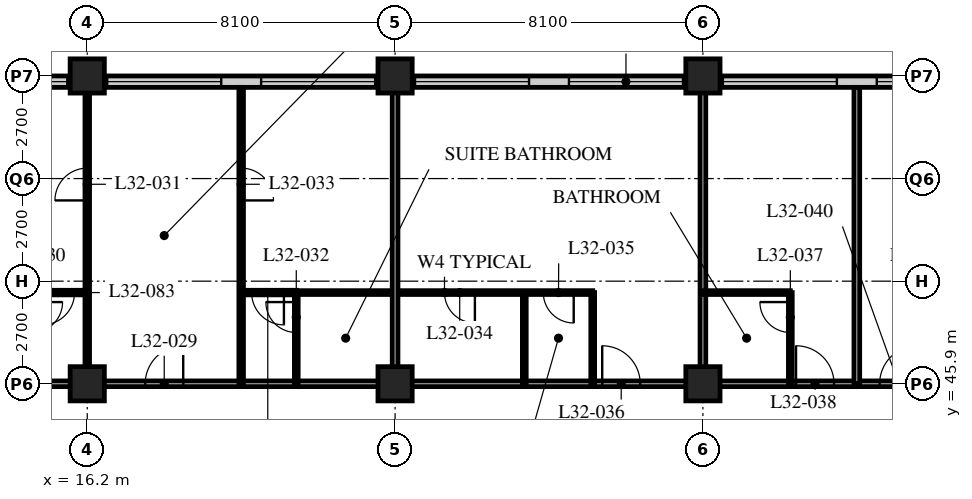
"""IFC4 building model, lengths in metres.
Left out: names, types, materials, properties, quantities, classifications, styles, units other than length and angle.
Written with IfcOpenShell. Run it as: python <this file> out.ifc"""

import sys

from ifc_helpers import new_model, si_unit, direction, frame, frame_2d, origin, origin_2d, place, context, subcontext, project, spatial, rectangle, hollow_rectangle, extrude, element, fill, save


model = new_model("IFC4")
c1 = context("Model", 3, precision=1e-05, world=origin(), true_north=direction((0.0, 1.0)))
c2 = subcontext(c1, "Body", "Model", "MODEL_VIEW")
j1 = project(units=[si_unit("LENGTHUNIT", "METRE"), si_unit("PLANEANGLEUNIT", "RADIAN")], contexts=[c1])
p1 = place(None, origin())
s1 = spatial("IfcSite", under=j1, at=p1, CompositionType="ELEMENT")
p2 = place(p1, origin())
s2 = spatial("IfcBuilding", under=s1, at=p2, CompositionType="ELEMENT")
p3 = place(p2, frame((0.0, 0.0, 127.2)))
s3 = spatial("IfcBuildingStorey", under=s2, at=p3, CompositionType="ELEMENT", Elevation=127.2)
for number, where, z_axis, x_axis in (
    (1, (16.2, 45.9, 0.0), (0.0, 0.0, 1.0), (1.0, 0.0, 0.0)),
    (2, (16.2, 54.0, 0.0), (0.0, 0.0, 1.0), (1.0, 0.0, 0.0)),
    (3, (24.3, 45.9, 0.0), (0.0, 0.0, 1.0), (1.0, 0.0, 0.0)),
    (4, (24.3, 54.0, 0.0), (0.0, 0.0, 1.0), (1.0, 0.0, 0.0)),
    (5, (32.4, 45.9, 0.0), (0.0, 0.0, 1.0), (1.0, 0.0, 0.0)),
    (6, (32.4, 54.0, 0.0), (0.0, 0.0, 1.0), (1.0, 0.0, 0.0)),
):
    element("IfcColumn", number, at=place(p3, frame(where, z_axis=z_axis, x_axis=x_axis)), inside=s3, PredefinedType="COLUMN", context=c2, shape_type="SweptSolid", body=[
        extrude(hollow_rectangle(XDim=0.9, YDim=0.9, WallThickness=0.09, at=origin_2d()), origin(), (0.0, 0.0, 1.0), 3.4),
    ])
p4 = place(p3, frame((48.3, 53.85, 0.0), z_axis=(0.0, 0.0, 1.0), x_axis=(-1.0, 0.0, 0.0)))
e7 = element("IfcWall", 7, at=p4, inside=s3, PredefinedType="SOLIDWALL", context=c2, shape_type="SweptSolid", body=[
    extrude(rectangle(XDim=40.2, YDim=0.3, at=frame_2d((20.1, 0.0))), origin(), (0.0, 0.0, 1.0), 3.19),
])
p5 = place(p4, frame((0.225, 0.0, 0.9)))
e8 = element("IfcOpeningElement", 8, at=p5, cuts=e7, PredefinedType="OPENING", context=c2, shape_type="SweptSolid", body=[
    extrude(rectangle(XDim=3.0, YDim=2.0, at=frame_2d((1.5, 1.0))), frame((0.0, 0.16, 0.0), z_axis=(0.0, -1.0, 0.0), x_axis=(1.0, 0.0, 0.0)), (0.0, 0.0, 1.0), 0.32),
])
p6 = place(p4, frame((4.275, 0.0, 0.9)))
e9 = element("IfcOpeningElement", 9, at=p6, cuts=e7, PredefinedType="OPENING", context=c2, shape_type="SweptSolid", body=[
    extrude(rectangle(XDim=3.0, YDim=2.0, at=frame_2d((1.5, 1.0))), frame((0.0, 0.16, 0.0), z_axis=(0.0, -1.0, 0.0), x_axis=(1.0, 0.0, 0.0)), (0.0, 0.0, 1.0), 0.32),
])
p7 = place(p4, frame((8.325, 0.0, 0.9)))
e10 = element("IfcOpeningElement", 10, at=p7, cuts=e7, PredefinedType="OPENING", context=c2, shape_type="SweptSolid", body=[
    extrude(rectangle(XDim=3.0, YDim=2.0, at=frame_2d((1.5, 1.0))), frame((0.0, 0.16, 0.0), z_axis=(0.0, -1.0, 0.0), x_axis=(1.0, 0.0, 0.0)), (0.0, 0.0, 1.0), 0.32),
])
p8 = place(p4, frame((12.375, 0.0, 0.9)))
e11 = element("IfcOpeningElement", 11, at=p8, cuts=e7, PredefinedType="OPENING", context=c2, shape_type="SweptSolid", body=[
    extrude(rectangle(XDim=3.0, YDim=2.0, at=frame_2d((1.5, 1.0))), frame((0.0, 0.16, 0.0), z_axis=(0.0, -1.0, 0.0), x_axis=(1.0, 0.0, 0.0)), (0.0, 0.0, 1.0), 0.32),
])
p9 = place(p4, frame((16.425, 0.0, 0.9)))
e12 = element("IfcOpeningElement", 12, at=p9, cuts=e7, PredefinedType="OPENING", context=c2, shape_type="SweptSolid", body=[
    extrude(rectangle(XDim=3.0, YDim=2.0, at=frame_2d((1.5, 1.0))), frame((0.0, 0.16, 0.0), z_axis=(0.0, -1.0, 0.0), x_axis=(1.0, 0.0, 0.0)), (0.0, 0.0, 1.0), 0.32),
])
p10 = place(p4, frame((20.475, 0.0, 0.9)))
e13 = element("IfcOpeningElement", 13, at=p10, cuts=e7, PredefinedType="OPENING", context=c2, shape_type="SweptSolid", body=[
    extrude(rectangle(XDim=3.0, YDim=2.0, at=frame_2d((1.5, 1.0))), frame((0.0, 0.16, 0.0), z_axis=(0.0, -1.0, 0.0), x_axis=(1.0, 0.0, 0.0)), (0.0, 0.0, 1.0), 0.32),
])
p11 = place(p4, frame((24.525, 0.0, 0.9)))
e14 = element("IfcOpeningElement", 14, at=p11, cuts=e7, PredefinedType="OPENING", context=c2, shape_type="SweptSolid", body=[
    extrude(rectangle(XDim=3.0, YDim=2.0, at=frame_2d((1.5, 1.0))), frame((0.0, 0.16, 0.0), z_axis=(0.0, -1.0, 0.0), x_axis=(1.0, 0.0, 0.0)), (0.0, 0.0, 1.0), 0.32),
])
p12 = place(p4, frame((28.575, 0.0, 0.9)))
e15 = element("IfcOpeningElement", 15, at=p12, cuts=e7, PredefinedType="OPENING", context=c2, shape_type="SweptSolid", body=[
    extrude(rectangle(XDim=3.0, YDim=2.0, at=frame_2d((1.5, 1.0))), frame((0.0, 0.16, 0.0), z_axis=(0.0, -1.0, 0.0), x_axis=(1.0, 0.0, 0.0)), (0.0, 0.0, 1.0), 0.32),
])
p13 = place(p4, frame((32.625, 0.0, 0.9)))
e16 = element("IfcOpeningElement", 16, at=p13, cuts=e7, PredefinedType="OPENING", context=c2, shape_type="SweptSolid", body=[
    extrude(rectangle(XDim=3.0, YDim=2.0, at=frame_2d((1.5, 1.0))), frame((0.0, 0.16, 0.0), z_axis=(0.0, -1.0, 0.0), x_axis=(1.0, 0.0, 0.0)), (0.0, 0.0, 1.0), 0.32),
])
p14 = place(p4, frame((36.675, 0.0, 0.9)))
e17 = element("IfcOpeningElement", 17, at=p14, cuts=e7, PredefinedType="OPENING", context=c2, shape_type="SweptSolid", body=[
    extrude(rectangle(XDim=3.0, YDim=2.0, at=frame_2d((1.5, 1.0))), frame((0.0, 0.16, 0.0), z_axis=(0.0, -1.0, 0.0), x_axis=(1.0, 0.0, 0.0)), (0.0, 0.0, 1.0), 0.32),
])
p15 = place(p3, frame((8.1, 45.9, 0.0), z_axis=(0.0, 0.0, 1.0), x_axis=(1.0, 0.0, 0.0)))
e18 = element("IfcWall", 18, at=p15, inside=s3, PredefinedType="PARTITIONING", context=c2, shape_type="SweptSolid", body=[
    extrude(rectangle(XDim=40.5, YDim=0.15, at=frame_2d((20.25, 0.0))), origin(), (0.0, 0.0, 1.0), 2.578),
])
p16 = place(p15, frame((9.625, 0.0, 0.0)))
e19 = element("IfcOpeningElement", 19, at=p16, cuts=e18, PredefinedType="OPENING", context=c2, shape_type="SweptSolid", body=[
    extrude(rectangle(XDim=1.0, YDim=2.1, at=frame_2d((0.5, 1.05))), frame((0.0, 0.085, 0.0), z_axis=(0.0, -1.0, 0.0), x_axis=(1.0, 0.0, 0.0)), (0.0, 0.0, 1.0), 0.17),
])
p17 = place(p15, frame((21.65, 0.0, 0.0)))
e20 = element("IfcOpeningElement", 20, at=p17, cuts=e18, PredefinedType="OPENING", context=c2, shape_type="SweptSolid", body=[
    extrude(rectangle(XDim=1.0, YDim=2.1, at=frame_2d((0.5, 1.05))), frame((0.0, 0.085, 0.0), z_axis=(0.0, -1.0, 0.0), x_axis=(1.0, 0.0, 0.0)), (0.0, 0.0, 1.0), 0.17),
])
p18 = place(p15, frame((26.75, 0.0, 0.0)))
e21 = element("IfcOpeningElement", 21, at=p18, cuts=e18, PredefinedType="OPENING", context=c2, shape_type="SweptSolid", body=[
    extrude(rectangle(XDim=1.0, YDim=2.1, at=frame_2d((0.5, 1.05))), frame((0.0, 0.085, 0.0), z_axis=(0.0, -1.0, 0.0), x_axis=(1.0, 0.0, 0.0)), (0.0, 0.0, 1.0), 0.17),
])
p19 = place(p15, frame((28.95, 0.0, 0.0)))
e22 = element("IfcOpeningElement", 22, at=p19, cuts=e18, PredefinedType="OPENING", context=c2, shape_type="SweptSolid", body=[
    extrude(rectangle(XDim=1.0, YDim=2.1, at=frame_2d((0.5, 1.05))), frame((0.0, 0.085, 0.0), z_axis=(0.0, -1.0, 0.0), x_axis=(1.0, 0.0, 0.0)), (0.0, 0.0, 1.0), 0.17),
])
p20 = place(p15, frame((34.85, 0.0, 0.0)))
e23 = element("IfcOpeningElement", 23, at=p20, cuts=e18, PredefinedType="OPENING", context=c2, shape_type="SweptSolid", body=[
    extrude(rectangle(XDim=1.0, YDim=2.1, at=frame_2d((0.5, 1.05))), frame((0.0, 0.085, 0.0), z_axis=(0.0, -1.0, 0.0), x_axis=(1.0, 0.0, 0.0)), (0.0, 0.0, 1.0), 0.17),
])
p21 = place(p15, frame((36.875, 0.0, 0.0)))
e24 = element("IfcOpeningElement", 24, at=p21, cuts=e18, PredefinedType="OPENING", context=c2, shape_type="SweptSolid", body=[
    extrude(rectangle(XDim=1.0, YDim=2.1, at=frame_2d((0.5, 1.05))), frame((0.0, 0.085, 0.0), z_axis=(0.0, -1.0, 0.0), x_axis=(1.0, 0.0, 0.0)), (0.0, 0.0, 1.0), 0.17),
])
p22 = place(p15, frame((2.625, 0.0, 0.0)))
e25 = element("IfcOpeningElement", 25, at=p22, cuts=e18, PredefinedType="OPENING", context=c2, shape_type="SweptSolid", body=[
    extrude(rectangle(XDim=1.0, YDim=2.1, at=frame_2d((0.5, 1.05))), frame((0.0, 0.085, 0.0), z_axis=(0.0, -1.0, 0.0), x_axis=(1.0, 0.0, 0.0)), (0.0, 0.0, 1.0), 0.17),
])
p23 = place(p3, frame((16.2, 45.9, 0.0), z_axis=(0.0, 0.0, 1.0), x_axis=(0.0, 1.0, 0.0)))
e26 = element("IfcWall", 26, at=p23, inside=s3, PredefinedType="PARTITIONING", context=c2, shape_type="SweptSolid", body=[
    extrude(rectangle(XDim=7.8, YDim=0.12, at=frame_2d((3.9, 0.0))), origin(), (0.0, 0.0, 1.0), 2.578),
])
p24 = place(p23, frame((4.825, 0.0, 0.0)))
e27 = element("IfcOpeningElement", 27, at=p24, cuts=e26, PredefinedType="OPENING", context=c2, shape_type="SweptSolid", body=[
    extrude(rectangle(XDim=0.85, YDim=2.1, at=frame_2d((0.425, 1.05))), frame((0.0, 0.07, 0.0), z_axis=(0.0, -1.0, 0.0), x_axis=(1.0, 0.0, 0.0)), (0.0, 0.0, 1.0), 0.14),
])
p25 = place(p3, frame((21.7, 48.3, 0.0), z_axis=(0.0, 0.0, 1.0), x_axis=(1.0, 0.0, 0.0)))
e28 = element("IfcWall", 28, at=p25, inside=s3, PredefinedType="PARTITIONING", context=c2, shape_type="SweptSolid", body=[
    extrude(rectangle(XDim=7.8, YDim=0.1, at=frame_2d((3.9, 0.0))), origin(), (0.0, 0.0, 1.0), 3.19),
])
p26 = place(p25, frame((3.9, 0.0, 0.0)))
e29 = element("IfcOpeningElement", 29, at=p26, cuts=e28, PredefinedType="OPENING", context=c2, shape_type="SweptSolid", body=[
    extrude(rectangle(XDim=0.8, YDim=2.1, at=frame_2d((0.4, 1.05))), frame((0.0, 0.06, 0.0), z_axis=(0.0, -1.0, 0.0), x_axis=(1.0, 0.0, 0.0)), (0.0, 0.0, 1.0), 0.12),
])
p27 = place(p25, frame((6.5, 0.0, 0.0)))
e30 = element("IfcOpeningElement", 30, at=p27, cuts=e28, PredefinedType="OPENING", context=c2, shape_type="SweptSolid", body=[
    extrude(rectangle(XDim=0.8, YDim=2.1, at=frame_2d((0.4, 1.05))), frame((0.0, 0.06, 0.0), z_axis=(0.0, -1.0, 0.0), x_axis=(1.0, 0.0, 0.0)), (0.0, 0.0, 1.0), 0.12),
])
p28 = place(p3, frame((21.7, 45.9, 0.0), z_axis=(0.0, 0.0, 1.0), x_axis=(0.0, 1.0, 0.0)))
e31 = element("IfcWall", 31, at=p28, inside=s3, PredefinedType="PARTITIONING", context=c2, shape_type="SweptSolid", body=[
    extrude(rectangle(XDim=2.4, YDim=0.1, at=frame_2d((1.2, 0.0))), origin(), (0.0, 0.0, 1.0), 3.19),
])
p29 = place(p28, frame((1.35, 0.0, 0.0)))
e32 = element("IfcOpeningElement", 32, at=p29, cuts=e31, PredefinedType="OPENING", context=c2, shape_type="SweptSolid", body=[
    extrude(rectangle(XDim=0.8, YDim=2.1, at=frame_2d((0.4, 1.05))), frame((0.0, 0.06, 0.0), z_axis=(0.0, -1.0, 0.0), x_axis=(1.0, 0.0, 0.0)), (0.0, 0.0, 1.0), 0.12),
])
p30 = place(p3, frame((20.25, 45.9, 0.0), z_axis=(0.0, 0.0, 1.0), x_axis=(0.0, 1.0, 0.0)))
e33 = element("IfcWall", 33, at=p30, inside=s3, PredefinedType="PARTITIONING", context=c2, shape_type="SweptSolid", body=[
    extrude(rectangle(XDim=7.8, YDim=0.12, at=frame_2d((3.9, 0.0))), origin(), (0.0, 0.0, 1.0), 3.19),
])
p31 = place(p30, frame((4.825, 0.0, 0.0)))
e34 = element("IfcOpeningElement", 34, at=p31, cuts=e33, PredefinedType="OPENING", context=c2, shape_type="SweptSolid", body=[
    extrude(rectangle(XDim=0.85, YDim=2.1, at=frame_2d((0.425, 1.05))), frame((0.0, 0.07, 0.0), z_axis=(0.0, -1.0, 0.0), x_axis=(1.0, 0.0, 0.0)), (0.0, 0.0, 1.0), 0.14),
])
p32 = place(p3, frame((24.3, 45.9, 0.0), z_axis=(0.0, 0.0, 1.0), x_axis=(0.0, 1.0, 0.0)))
e35 = element("IfcWall", 35, at=p32, inside=s3, PredefinedType="PARTITIONING", context=c2, shape_type="SweptSolid", body=[
    extrude(rectangle(XDim=7.8, YDim=0.15, at=frame_2d((3.9, 0.0))), origin(), (0.0, 0.0, 1.0), 2.578),
])
for number, where, z_axis, x_axis in (
    (36, (27.7, 45.9, 0.0), (0.0, 0.0, 1.0), (0.0, 1.0, 0.0)),
    (37, (29.5, 45.9, 0.0), (0.0, 0.0, 1.0), (0.0, 1.0, 0.0)),
):
    element("IfcWall", number, at=place(p3, frame(where, z_axis=z_axis, x_axis=x_axis)), inside=s3, PredefinedType="PARTITIONING", context=c2, shape_type="SweptSolid", body=[
        extrude(rectangle(XDim=2.4, YDim=0.1, at=frame_2d((1.2, 0.0))), origin(), (0.0, 0.0, 1.0), 3.19),
    ])
p33 = place(p3, frame((32.4, 45.9, 0.0), z_axis=(0.0, 0.0, 1.0), x_axis=(0.0, 1.0, 0.0)))
e38 = element("IfcWall", 38, at=p33, inside=s3, PredefinedType="PARTITIONING", context=c2, shape_type="SweptSolid", body=[
    extrude(rectangle(XDim=7.8, YDim=0.15, at=frame_2d((3.9, 0.0))), origin(), (0.0, 0.0, 1.0), 2.578),
])
p34 = place(p3, frame((32.4, 48.3, 0.0), z_axis=(0.0, 0.0, 1.0), x_axis=(1.0, 0.0, 0.0)))
e39 = element("IfcWall", 39, at=p34, inside=s3, PredefinedType="PARTITIONING", context=c2, shape_type="SweptSolid", body=[
    extrude(rectangle(XDim=2.3, YDim=0.1, at=frame_2d((1.15, 0.0))), origin(), (0.0, 0.0, 1.0), 3.19),
])
p35 = place(p3, frame((34.7, 45.9, 0.0), z_axis=(0.0, 0.0, 1.0), x_axis=(0.0, 1.0, 0.0)))
e40 = element("IfcWall", 40, at=p35, inside=s3, PredefinedType="PARTITIONING", context=c2, shape_type="SweptSolid", body=[
    extrude(rectangle(XDim=2.4, YDim=0.1, at=frame_2d((1.2, 0.0))), origin(), (0.0, 0.0, 1.0), 3.19),
])
p36 = place(p35, frame((1.35, 0.0, 0.0)))
e41 = element("IfcOpeningElement", 41, at=p36, cuts=e40, PredefinedType="OPENING", context=c2, shape_type="SweptSolid", body=[
    extrude(rectangle(XDim=0.8, YDim=2.1, at=frame_2d((0.4, 1.05))), frame((0.0, 0.06, 0.0), z_axis=(0.0, -1.0, 0.0), x_axis=(1.0, 0.0, 0.0)), (0.0, 0.0, 1.0), 0.12),
])
p37 = place(p3, frame((36.45, 45.9, 0.0), z_axis=(0.0, 0.0, 1.0), x_axis=(0.0, 1.0, 0.0)))
e42 = element("IfcWall", 42, at=p37, inside=s3, PredefinedType="PARTITIONING", context=c2, shape_type="SweptSolid", body=[
    extrude(rectangle(XDim=7.8, YDim=0.15, at=frame_2d((3.9, 0.0))), origin(), (0.0, 0.0, 1.0), 3.19),
])
p38 = place(p3, frame((14.74, 48.3, 0.0), z_axis=(0.0, 0.0, 1.0), x_axis=(1.0, 0.0, 0.0)))
e43 = element("IfcWall", 43, at=p38, inside=s3, PredefinedType="PARTITIONING", context=c2, shape_type="SweptSolid", body=[
    extrude(rectangle(XDim=1.46, YDim=0.12, at=frame_2d((0.73, 0.0))), origin(), (0.0, 0.0, 1.0), 3.19),
])
p39 = place(p38, frame((0.275, 0.0, 0.0)))
e44 = element("IfcOpeningElement", 44, at=p39, cuts=e43, PredefinedType="OPENING", context=c2, shape_type="SweptSolid", body=[
    extrude(rectangle(XDim=0.85, YDim=2.1, at=frame_2d((0.425, 1.05))), frame((0.0, 0.07, 0.0), z_axis=(0.0, -1.0, 0.0), x_axis=(1.0, 0.0, 0.0)), (0.0, 0.0, 1.0), 0.14),
])
p40 = place(p3, frame((20.25, 48.3, 0.0), z_axis=(0.0, 0.0, 1.0), x_axis=(1.0, 0.0, 0.0)))
e45 = element("IfcWall", 45, at=p40, inside=s3, PredefinedType="PARTITIONING", context=c2, shape_type="SweptSolid", body=[
    extrude(rectangle(XDim=1.46, YDim=0.12, at=frame_2d((0.73, 0.0))), origin(), (0.0, 0.0, 1.0), 3.19),
])
p41 = place(p40, frame((0.275, 0.0, 0.0)))
e46 = element("IfcOpeningElement", 46, at=p41, cuts=e45, PredefinedType="OPENING", context=c2, shape_type="SweptSolid", body=[
    extrude(rectangle(XDim=0.85, YDim=2.1, at=frame_2d((0.425, 1.05))), frame((0.0, 0.07, 0.0), z_axis=(0.0, -1.0, 0.0), x_axis=(1.0, 0.0, 0.0)), (0.0, 0.0, 1.0), 0.14),
])
p42 = place(p7, origin())
e47 = element("IfcWindow", 47, at=p42, inside=s3, PartitioningType="SINGLE_PANEL", PredefinedType="WINDOW", context=c2, shape_type="SweptSolid", body=[
    extrude(rectangle(XDim=3.0, YDim=2.0, at=frame_2d((1.5, 1.0))), frame((0.0, 0.03, 0.0), z_axis=(0.0, -1.0, 0.0), x_axis=(1.0, 0.0, 0.0)), (0.0, 0.0, 1.0), 0.06),
])
fill(e10, e47)
p43 = place(p8, origin())
e48 = element("IfcWindow", 48, at=p43, inside=s3, PartitioningType="SINGLE_PANEL", PredefinedType="WINDOW", context=c2, shape_type="SweptSolid", body=[
    extrude(rectangle(XDim=3.0, YDim=2.0, at=frame_2d((1.5, 1.0))), frame((0.0, 0.03, 0.0), z_axis=(0.0, -1.0, 0.0), x_axis=(1.0, 0.0, 0.0)), (0.0, 0.0, 1.0), 0.06),
])
fill(e11, e48)
p44 = place(p9, origin())
e49 = element("IfcWindow", 49, at=p44, inside=s3, PartitioningType="SINGLE_PANEL", PredefinedType="WINDOW", context=c2, shape_type="SweptSolid", body=[
    extrude(rectangle(XDim=3.0, YDim=2.0, at=frame_2d((1.5, 1.0))), frame((0.0, 0.03, 0.0), z_axis=(0.0, -1.0, 0.0), x_axis=(1.0, 0.0, 0.0)), (0.0, 0.0, 1.0), 0.06),
])
fill(e12, e49)
p45 = place(p10, origin())
e50 = element("IfcWindow", 50, at=p45, inside=s3, PartitioningType="SINGLE_PANEL", PredefinedType="WINDOW", context=c2, shape_type="SweptSolid", body=[
    extrude(rectangle(XDim=3.0, YDim=2.0, at=frame_2d((1.5, 1.0))), frame((0.0, 0.03, 0.0), z_axis=(0.0, -1.0, 0.0), x_axis=(1.0, 0.0, 0.0)), (0.0, 0.0, 1.0), 0.06),
])
fill(e13, e50)
p46 = place(p11, origin())
e51 = element("IfcWindow", 51, at=p46, inside=s3, PartitioningType="SINGLE_PANEL", PredefinedType="WINDOW", context=c2, shape_type="SweptSolid", body=[
    extrude(rectangle(XDim=3.0, YDim=2.0, at=frame_2d((1.5, 1.0))), frame((0.0, 0.03, 0.0), z_axis=(0.0, -1.0, 0.0), x_axis=(1.0, 0.0, 0.0)), (0.0, 0.0, 1.0), 0.06),
])
fill(e14, e51)
p47 = place(p12, origin())
e52 = element("IfcWindow", 52, at=p47, inside=s3, PartitioningType="SINGLE_PANEL", PredefinedType="WINDOW", context=c2, shape_type="SweptSolid", body=[
    extrude(rectangle(XDim=3.0, YDim=2.0, at=frame_2d((1.5, 1.0))), frame((0.0, 0.03, 0.0), z_axis=(0.0, -1.0, 0.0), x_axis=(1.0, 0.0, 0.0)), (0.0, 0.0, 1.0), 0.06),
])
fill(e15, e52)
p48 = place(p13, origin())
e53 = element("IfcWindow", 53, at=p48, inside=s3, PartitioningType="SINGLE_PANEL", PredefinedType="WINDOW", context=c2, shape_type="SweptSolid", body=[
    extrude(rectangle(XDim=3.0, YDim=2.0, at=frame_2d((1.5, 1.0))), frame((0.0, 0.03, 0.0), z_axis=(0.0, -1.0, 0.0), x_axis=(1.0, 0.0, 0.0)), (0.0, 0.0, 1.0), 0.06),
])
fill(e16, e53)
p49 = place(p16, origin())
e54 = element("IfcDoor", 54, at=p49, inside=s3, OperationType="SINGLE_SWING_RIGHT", PredefinedType="DOOR", context=c2, shape_type="SweptSolid", body=[
    extrude(rectangle(XDim=1.0, YDim=2.1, at=frame_2d((0.5, 1.05))), frame((0.0, 0.025, 0.0), z_axis=(0.0, -1.0, 0.0), x_axis=(1.0, 0.0, 0.0)), (0.0, 0.0, 1.0), 0.05),
])
fill(e19, e54)
p50 = place(p24, origin())
e55 = element("IfcDoor", 55, at=p50, inside=s3, OperationType="SINGLE_SWING_LEFT", PredefinedType="DOOR", context=c2, shape_type="SweptSolid", body=[
    extrude(rectangle(XDim=0.85, YDim=2.1, at=frame_2d((0.425, 1.05))), frame((0.0, 0.025, 0.0), z_axis=(0.0, -1.0, 0.0), x_axis=(1.0, 0.0, 0.0)), (0.0, 0.0, 1.0), 0.05),
])
fill(e27, e55)
p51 = place(p29, origin())
e56 = element("IfcDoor", 56, at=p51, inside=s3, OperationType="SINGLE_SWING_RIGHT", PredefinedType="DOOR", context=c2, shape_type="SweptSolid", body=[
    extrude(rectangle(XDim=0.8, YDim=2.1, at=frame_2d((0.4, 1.05))), frame((0.0, 0.025, 0.0), z_axis=(0.0, -1.0, 0.0), x_axis=(1.0, 0.0, 0.0)), (0.0, 0.0, 1.0), 0.05),
])
fill(e32, e56)
p52 = place(p31, origin())
e57 = element("IfcDoor", 57, at=p52, inside=s3, OperationType="SINGLE_SWING_RIGHT", PredefinedType="DOOR", context=c2, shape_type="SweptSolid", body=[
    extrude(rectangle(XDim=0.85, YDim=2.1, at=frame_2d((0.425, 1.05))), frame((0.0, 0.025, 0.0), z_axis=(0.0, -1.0, 0.0), x_axis=(1.0, 0.0, 0.0)), (0.0, 0.0, 1.0), 0.05),
])
fill(e34, e57)
p53 = place(p26, origin())
e58 = element("IfcDoor", 58, at=p53, inside=s3, OperationType="SINGLE_SWING_LEFT", PredefinedType="DOOR", context=c2, shape_type="SweptSolid", body=[
    extrude(rectangle(XDim=0.8, YDim=2.1, at=frame_2d((0.4, 1.05))), frame((0.0, 0.025, 0.0), z_axis=(0.0, -1.0, 0.0), x_axis=(1.0, 0.0, 0.0)), (0.0, 0.0, 1.0), 0.05),
])
fill(e29, e58)
p54 = place(p27, origin())
e59 = element("IfcDoor", 59, at=p54, inside=s3, OperationType="SINGLE_SWING_LEFT", PredefinedType="DOOR", context=c2, shape_type="SweptSolid", body=[
    extrude(rectangle(XDim=0.8, YDim=2.1, at=frame_2d((0.4, 1.05))), frame((0.0, 0.025, 0.0), z_axis=(0.0, -1.0, 0.0), x_axis=(1.0, 0.0, 0.0)), (0.0, 0.0, 1.0), 0.05),
])
fill(e30, e59)
p55 = place(p17, origin())
e60 = element("IfcDoor", 60, at=p55, inside=s3, OperationType="SINGLE_SWING_LEFT", PredefinedType="DOOR", context=c2, shape_type="SweptSolid", body=[
    extrude(rectangle(XDim=1.0, YDim=2.1, at=frame_2d((0.5, 1.05))), frame((0.0, 0.025, 0.0), z_axis=(0.0, -1.0, 0.0), x_axis=(1.0, 0.0, 0.0)), (0.0, 0.0, 1.0), 0.05),
])
fill(e20, e60)
p56 = place(p36, origin())
e61 = element("IfcDoor", 61, at=p56, inside=s3, OperationType="SINGLE_SWING_RIGHT", PredefinedType="DOOR", context=c2, shape_type="SweptSolid", body=[
    extrude(rectangle(XDim=0.8, YDim=2.1, at=frame_2d((0.4, 1.05))), frame((0.0, 0.025, 0.0), z_axis=(0.0, -1.0, 0.0), x_axis=(1.0, 0.0, 0.0)), (0.0, 0.0, 1.0), 0.05),
])
fill(e41, e61)
p57 = place(p18, origin())
e62 = element("IfcDoor", 62, at=p57, inside=s3, OperationType="SINGLE_SWING_LEFT", PredefinedType="DOOR", context=c2, shape_type="SweptSolid", body=[
    extrude(rectangle(XDim=1.0, YDim=2.1, at=frame_2d((0.5, 1.05))), frame((0.0, 0.025, 0.0), z_axis=(0.0, -1.0, 0.0), x_axis=(1.0, 0.0, 0.0)), (0.0, 0.0, 1.0), 0.05),
])
fill(e21, e62)
p58 = place(p19, origin())
e63 = element("IfcDoor", 63, at=p58, inside=s3, OperationType="SINGLE_SWING_RIGHT", PredefinedType="DOOR", context=c2, shape_type="SweptSolid", body=[
    extrude(rectangle(XDim=1.0, YDim=2.1, at=frame_2d((0.5, 1.05))), frame((0.0, 0.025, 0.0), z_axis=(0.0, -1.0, 0.0), x_axis=(1.0, 0.0, 0.0)), (0.0, 0.0, 1.0), 0.05),
])
fill(e22, e63)
p59 = place(p39, origin())
e64 = element("IfcDoor", 64, at=p59, inside=s3, OperationType="SINGLE_SWING_RIGHT", PredefinedType="DOOR", context=c2, shape_type="SweptSolid", body=[
    extrude(rectangle(XDim=0.85, YDim=2.1, at=frame_2d((0.425, 1.05))), frame((0.0, 0.025, 0.0), z_axis=(0.0, -1.0, 0.0), x_axis=(1.0, 0.0, 0.0)), (0.0, 0.0, 1.0), 0.05),
])
fill(e44, e64)
p60 = place(p41, origin())
e65 = element("IfcDoor", 65, at=p60, inside=s3, OperationType="SINGLE_SWING_LEFT", PredefinedType="DOOR", context=c2, shape_type="SweptSolid", body=[
    extrude(rectangle(XDim=0.85, YDim=2.1, at=frame_2d((0.425, 1.05))), frame((0.0, 0.025, 0.0), z_axis=(0.0, -1.0, 0.0), x_axis=(1.0, 0.0, 0.0)), (0.0, 0.0, 1.0), 0.05),
])
fill(e46, e65)
save(model, sys.argv[1])
